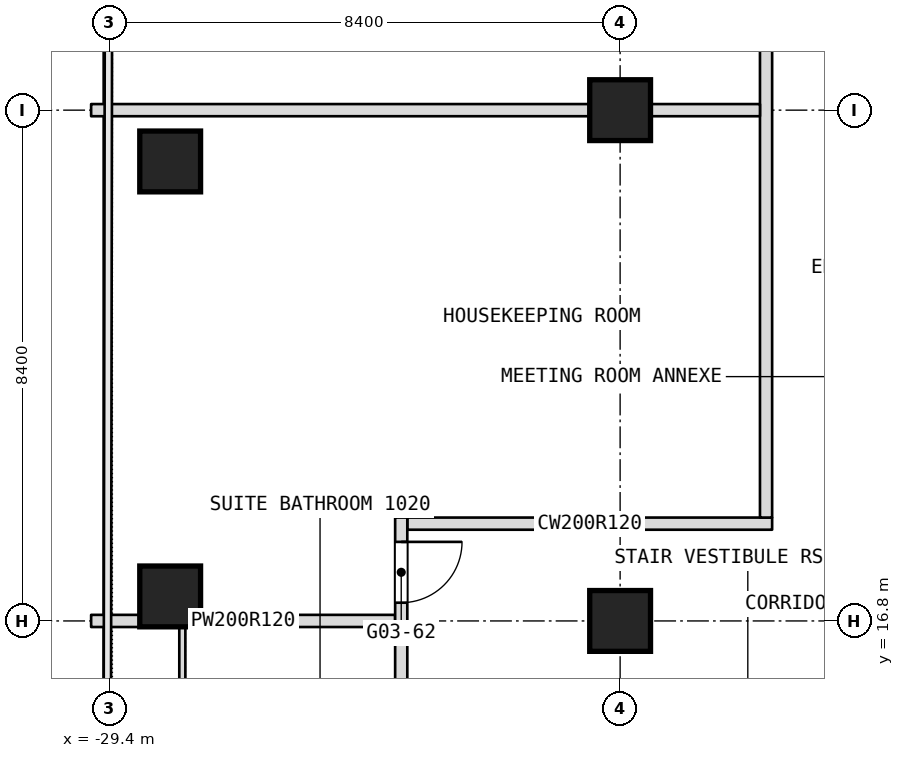
"""IFC4 building model, lengths in metres.
Left out: names, types, materials, properties, quantities, classifications, styles, units other than length and angle.
Written with IfcOpenShell. Run it as: python <this file> out.ifc"""

import sys

from ifc_helpers import new_model, si_unit, direction, frame, frame_2d, origin, origin_2d, place, context, subcontext, project, spatial, rectangle, extrude, element, fill, save


model = new_model("IFC4")
c1 = context("Model", 3, precision=1e-05, world=origin(), true_north=direction((0.0, 1.0)))
c2 = subcontext(c1, "Body", "Model", "MODEL_VIEW")
j1 = project(units=[si_unit("LENGTHUNIT", "METRE"), si_unit("PLANEANGLEUNIT", "RADIAN")], contexts=[c1])
p1 = place(None, origin())
s1 = spatial("IfcSite", under=j1, at=p1, CompositionType="ELEMENT")
p2 = place(p1, origin())
s2 = spatial("IfcBuilding", under=s1, at=p2, CompositionType="ELEMENT")
p3 = place(p2, frame((0.0, 0.0, 50.9)))
s3 = spatial("IfcBuildingStorey", under=s2, at=p3, CompositionType="ELEMENT", Elevation=50.9)
for number, where, z_axis, x_axis in (
    (1, (-21.0, 16.8, 0.0), (0.0, 0.0, 1.0), (1.0, 0.0, 0.0)),
    (2, (-21.0, 25.2, 0.0), (0.0, 0.0, 1.0), (1.0, 0.0, 0.0)),
    (3, (-28.4, 17.203, 0.0), (0.0, 0.0, 1.0), (1.0, 0.0, 0.0)),
    (4, (-28.4, 24.356, 0.0), (0.0, 0.0, 1.0), (1.0, 0.0, 0.0)),
):
    element("IfcColumn", number, at=place(p3, frame(where, z_axis=z_axis, x_axis=x_axis)), inside=s3, PredefinedType="COLUMN", context=c2, shape_type="SweptSolid", body=[
        extrude(rectangle(XDim=1.0, YDim=1.0, at=origin_2d()), origin(), (0.0, 0.0, 1.0), 3.6),
    ])
p4 = place(p3, frame((-29.7, 16.8, 0.0), z_axis=(0.0, 0.0, 1.0), x_axis=(1.0, 0.0, 0.0)))
e5 = element("IfcWall", 5, at=p4, inside=s3, PredefinedType="PARTITIONING", context=c2, shape_type="SweptSolid", body=[
    extrude(rectangle(XDim=5.0, YDim=0.2, at=frame_2d((2.5, 0.0))), origin(), (0.0, 0.0, 1.0), 2.84),
])
p5 = place(p3, frame((-24.5, 18.4, 0.0), z_axis=(0.0, 0.0, 1.0), x_axis=(1.0, 0.0, 0.0)))
e6 = element("IfcWall", 6, at=p5, inside=s3, PredefinedType="PARTITIONING", context=c2, shape_type="SweptSolid", body=[
    extrude(rectangle(XDim=6.0, YDim=0.2, at=frame_2d((3.0, 0.0))), origin(), (0.0, 0.0, 1.0), 3.34),
])
p6 = place(p3, frame((-18.6, 18.5, 0.0), z_axis=(0.0, 0.0, 1.0), x_axis=(0.0, 1.0, 0.0)))
e7 = element("IfcWall", 7, at=p6, inside=s3, PredefinedType="PARTITIONING", context=c2, shape_type="SweptSolid", body=[
    extrude(rectangle(XDim=15.04, YDim=0.2, at=frame_2d((7.52, 0.0))), origin(), (0.0, 0.0, 1.0), 3.34),
])
p7 = place(p6, frame((8.25, 0.0, 0.0)))
e8 = element("IfcOpeningElement", 8, at=p7, cuts=e7, PredefinedType="OPENING", context=c2, shape_type="SweptSolid", body=[
    extrude(rectangle(XDim=1.1, YDim=2.1, at=frame_2d((0.55, 1.05))), frame((0.0, 0.1, 0.0), z_axis=(0.0, -1.0, 0.0), x_axis=(1.0, 0.0, 0.0)), (0.0, 0.0, 1.0), 0.2),
])
p8 = place(p3, frame((-24.6, 6.9, 0.0), z_axis=(0.0, 0.0, 1.0), x_axis=(0.0, 1.0, 0.0)))
e9 = element("IfcWall", 9, at=p8, inside=s3, PredefinedType="PARTITIONING", context=c2, shape_type="SweptSolid", body=[
    extrude(rectangle(XDim=11.6, YDim=0.2, at=frame_2d((5.8, 0.0))), origin(), (0.0, 0.0, 1.0), 3.34),
])
p9 = place(p8, frame((5.1, 0.0, 0.0)))
e10 = element("IfcOpeningElement", 10, at=p9, cuts=e9, PredefinedType="OPENING", context=c2, shape_type="SweptSolid", body=[
    extrude(rectangle(XDim=1.1, YDim=2.1, at=frame_2d((0.55, 1.05))), frame((0.0, 0.1, 0.0), z_axis=(0.0, -1.0, 0.0), x_axis=(1.0, 0.0, 0.0)), (0.0, 0.0, 1.0), 0.2),
])
p10 = place(p8, frame((10.2, 0.0, 0.0)))
e11 = element("IfcOpeningElement", 11, at=p10, cuts=e9, PredefinedType="OPENING", context=c2, shape_type="SweptSolid", body=[
    extrude(rectangle(XDim=1.0, YDim=2.1, at=frame_2d((0.5, 1.05))), frame((0.0, 0.1, 0.0), z_axis=(0.0, -1.0, 0.0), x_axis=(1.0, 0.0, 0.0)), (0.0, 0.0, 1.0), 0.2),
])
p11 = place(p3, frame((-29.7, 25.2, 0.0), z_axis=(0.0, 0.0, 1.0), x_axis=(1.0, 0.0, 0.0)))
e12 = element("IfcWall", 12, at=p11, inside=s3, PredefinedType="PARTITIONING", context=c2, shape_type="SweptSolid", body=[
    extrude(rectangle(XDim=11.0, YDim=0.2, at=frame_2d((5.5, 0.0))), origin(), (0.0, 0.0, 1.0), 2.84),
])
p12 = place(p3, frame((-28.2, 13.15, 0.0), z_axis=(0.0, 0.0, 1.0), x_axis=(0.0, 1.0, 0.0)))
e13 = element("IfcWall", 13, at=p12, inside=s3, PredefinedType="PARTITIONING", context=c2, shape_type="SweptSolid", body=[
    extrude(rectangle(XDim=3.75, YDim=0.1, at=frame_2d((1.875, 0.0))), origin(), (0.0, 0.0, 1.0), 2.94),
])
p13 = place(p10, origin())
e14 = element("IfcDoor", 14, at=p13, inside=s3, OperationType="SINGLE_SWING_RIGHT", PredefinedType="DOOR", context=c2, shape_type="SweptSolid", body=[
    extrude(rectangle(XDim=1.0, YDim=2.1, at=frame_2d((0.5, 1.05))), frame((0.0, 0.025, 0.0), z_axis=(0.0, -1.0, 0.0), x_axis=(1.0, 0.0, 0.0)), (0.0, 0.0, 1.0), 0.05),
])
fill(e11, e14)
save(model, sys.argv[1])
